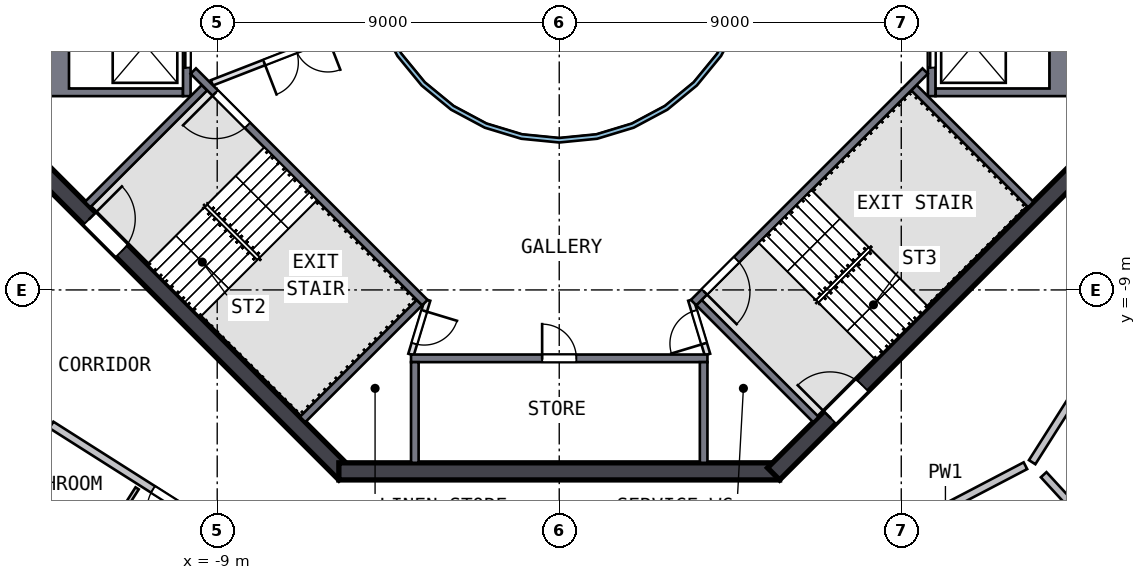
"""IFC4 building model, lengths in metres.
Left out: names, types, materials, properties, quantities, classifications, styles, units other than length and angle.
Written with IfcOpenShell. Run it as: python <this file> out.ifc"""

import sys

from ifc_helpers import new_model, si_unit, direction, frame, frame_2d, origin, place, context, subcontext, project, spatial, polyline, rectangle, outline, extrude, element, fill, save


model = new_model("IFC4")
c1 = context("Model", 3, precision=1e-05, world=origin(), true_north=direction((0.0, 1.0)))
c2 = subcontext(c1, "Body", "Model", "MODEL_VIEW")
j1 = project(units=[si_unit("LENGTHUNIT", "METRE"), si_unit("PLANEANGLEUNIT", "RADIAN")], contexts=[c1])
p1 = place(None, origin())
s1 = spatial("IfcSite", under=j1, at=p1, CompositionType="ELEMENT")
p2 = place(p1, origin())
s2 = spatial("IfcBuilding", under=s1, at=p2, CompositionType="ELEMENT")
p3 = place(p2, frame((0.0, 0.0, 269.0)))
s3 = spatial("IfcBuildingStorey", under=s2, at=p3, CompositionType="ELEMENT", Elevation=269.0)
p4 = place(p3, frame((-13.841, -5.64, 0.0), z_axis=(0.0, 0.0, 1.0), x_axis=(0.707106781, -0.707106781, 0.0)))
e1 = element("IfcWall", 1, at=p4, inside=s3, PredefinedType="SHEAR", context=c2, shape_type="SweptSolid", body=[
    extrude(rectangle(XDim=11.598, YDim=0.45, at=frame_2d((5.799, 0.0))), origin(), (0.0, 0.0, 1.0), 5.0),
])
p5 = place(p4, frame((2.099, 0.0, 0.0)))
e2 = element("IfcOpeningElement", 2, at=p5, cuts=e1, PredefinedType="OPENING", context=c2, shape_type="SweptSolid", body=[
    extrude(rectangle(XDim=1.2, YDim=2.1, at=frame_2d((0.6, 1.05))), frame((0.0, 0.235, 0.0), z_axis=(0.0, -1.0, 0.0), x_axis=(1.0, 0.0, 0.0)), (0.0, 0.0, 1.0), 0.47),
])
p6 = place(p3, frame((-5.799, -13.775, 0.0), z_axis=(0.0, 0.0, 1.0), x_axis=(1.0, 0.0, 0.0)))
e3 = element("IfcWall", 3, at=p6, inside=s3, PredefinedType="SHEAR", context=c2, shape_type="SweptSolid", body=[
    extrude(rectangle(XDim=11.598, YDim=0.45, at=frame_2d((5.799, 0.0))), origin(), (0.0, 0.0, 1.0), 5.0),
])
p7 = place(p3, frame((5.64, -13.841, 0.0), z_axis=(0.0, 0.0, 1.0), x_axis=(0.707106781, 0.707106781, 0.0)))
e4 = element("IfcWall", 4, at=p7, inside=s3, PredefinedType="SHEAR", context=c2, shape_type="SweptSolid", body=[
    extrude(rectangle(XDim=11.598, YDim=0.45, at=frame_2d((5.799, 0.0))), origin(), (0.0, 0.0, 1.0), 5.0),
])
p8 = place(p7, frame((2.099, 0.0, 0.0)))
e5 = element("IfcOpeningElement", 5, at=p8, cuts=e4, PredefinedType="OPENING", context=c2, shape_type="SweptSolid", body=[
    extrude(rectangle(XDim=1.2, YDim=2.1, at=frame_2d((0.6, 1.05))), frame((0.0, 0.235, 0.0), z_axis=(0.0, -1.0, 0.0), x_axis=(1.0, 0.0, 0.0)), (0.0, 0.0, 1.0), 0.47),
])
p9 = place(p3, origin())
e6 = element("IfcWall", 6, at=p9, inside=s3, PredefinedType="SOLIDWALL", context=c2, shape_type="SweptSolid", body=[
    extrude(outline(polyline([(13.55, -3.9), (9.9, -3.9), (9.9, -3.7), (12.9, -3.7), (12.9, -1.4), (9.9, -1.4), (9.9, -1.2), (13.55, -1.2), (13.55, -3.9)])), origin(), (0.0, 0.0, 1.0), 4.69),
])
p10 = place(p3, frame((9.8, -1.2, 0.0), z_axis=(0.0, 0.0, 1.0), x_axis=(0.0, -1.0, 0.0)))
e7 = element("IfcWall", 7, at=p10, inside=s3, PredefinedType="SOLIDWALL", context=c2, shape_type="SweptSolid", body=[
    extrude(rectangle(XDim=2.7, YDim=0.2, at=frame_2d((1.35, 0.0))), origin(), (0.0, 0.0, 1.0), 4.69),
])
p11 = place(p10, frame((0.75, 0.0, 0.0)))
e8 = element("IfcOpeningElement", 8, at=p11, cuts=e7, PredefinedType="OPENING", context=c2, shape_type="SweptSolid", body=[
    extrude(rectangle(XDim=1.2, YDim=2.1, at=frame_2d((0.6, 1.05))), frame((0.0, 0.11, 0.0), z_axis=(0.0, -1.0, 0.0), x_axis=(1.0, 0.0, 0.0)), (0.0, 0.0, 1.0), 0.22),
])
p12 = place(p3, origin())
e9 = element("IfcWall", 9, at=p12, inside=s3, PredefinedType="SOLIDWALL", context=c2, shape_type="SweptSolid", body=[
    extrude(outline(polyline([(-13.55, -3.9), (-13.55, -1.2), (-9.9, -1.2), (-9.9, -1.4), (-12.9, -1.4), (-12.9, -3.7), (-9.9, -3.7), (-9.9, -3.9), (-13.55, -3.9)])), origin(), (0.0, 0.0, 1.0), 4.69),
])
p13 = place(p3, frame((-9.8, -1.2, 0.0), z_axis=(0.0, 0.0, 1.0), x_axis=(0.0, -1.0, 0.0)))
e10 = element("IfcWall", 10, at=p13, inside=s3, PredefinedType="SOLIDWALL", context=c2, shape_type="SweptSolid", body=[
    extrude(rectangle(XDim=2.7, YDim=0.2, at=frame_2d((1.35, 0.0))), origin(), (0.0, 0.0, 1.0), 4.69),
])
p14 = place(p13, frame((0.75, 0.0, 0.0)))
e11 = element("IfcOpeningElement", 11, at=p14, cuts=e10, PredefinedType="OPENING", context=c2, shape_type="SweptSolid", body=[
    extrude(rectangle(XDim=1.2, YDim=2.1, at=frame_2d((0.6, 1.05))), frame((0.0, 0.11, 0.0), z_axis=(0.0, -1.0, 0.0), x_axis=(1.0, 0.0, 0.0)), (0.0, 0.0, 1.0), 0.22),
])
p15 = place(p3, frame((-3.9, -10.8, 0.0), z_axis=(0.0, 0.0, 1.0), x_axis=(1.0, 0.0, 0.0)))
e12 = element("IfcWall", 12, at=p15, inside=s3, PredefinedType="SOLIDWALL", context=c2, shape_type="SweptSolid", body=[
    extrude(rectangle(XDim=7.8, YDim=0.2, at=frame_2d((3.9, 0.0))), origin(), (0.0, 0.0, 1.0), 4.69),
])
p16 = place(p15, frame((3.45, 0.0, 0.0)))
e13 = element("IfcOpeningElement", 13, at=p16, cuts=e12, PredefinedType="OPENING", context=c2, shape_type="SweptSolid", body=[
    extrude(rectangle(XDim=0.9, YDim=2.1, at=frame_2d((0.45, 1.05))), frame((0.0, 0.11, 0.0), z_axis=(0.0, -1.0, 0.0), x_axis=(1.0, 0.0, 0.0)), (0.0, 0.0, 1.0), 0.22),
])
for number, where, z_axis, x_axis in (
    (14, (-3.8, -10.9, 0.0), (0.0, 0.0, 1.0), (0.0, -1.0, 0.0)),
    (15, (3.8, -10.9, 0.0), (0.0, 0.0, 1.0), (0.0, -1.0, 0.0)),
):
    element("IfcWall", number, at=place(p3, frame(where, z_axis=z_axis, x_axis=x_axis)), inside=s3, PredefinedType="SOLIDWALL", context=c2, shape_type="SweptSolid", body=[
        extrude(rectangle(XDim=2.65, YDim=0.2, at=frame_2d((1.325, 0.0))), origin(), (0.0, 0.0, 1.0), 4.69),
    ])
p17 = place(p3, frame((-3.535, -9.334, 0.0), z_axis=(0.0, 0.0, 1.0), x_axis=(-0.707120946, 0.707092617, 0.0)))
e16 = element("IfcWall", 16, at=p17, inside=s3, PredefinedType="SOLIDWALL", context=c2, shape_type="SweptSolid", body=[
    extrude(rectangle(XDim=8.618, YDim=0.2, at=frame_2d((4.309, 0.0))), origin(), (0.0, 0.0, 1.0), 4.69),
])
p18 = place(p17, frame((6.6, 0.0, 0.0)))
e17 = element("IfcOpeningElement", 17, at=p18, cuts=e16, PredefinedType="OPENING", context=c2, shape_type="SweptSolid", body=[
    extrude(rectangle(XDim=1.2, YDim=2.1, at=frame_2d((0.6, 1.05))), frame((0.0, 0.11, 0.0), z_axis=(0.0, -1.0, 0.0), x_axis=(1.0, 0.0, 0.0)), (0.0, 0.0, 1.0), 0.22),
])
for number, where, z_axis, x_axis in (
    (18, (-9.334, -3.677, 0.0), (0.0, 0.0, 1.0), (-0.707, -0.707, 0.0)),
    (19, (-3.677, -9.334, 0.0), (0.0, 0.0, 1.0), (-0.707, -0.707, 0.0)),
):
    element("IfcWall", number, at=place(p3, frame(where, z_axis=z_axis, x_axis=x_axis)), inside=s3, PredefinedType="SOLIDWALL", context=c2, shape_type="SweptSolid", body=[
        extrude(rectangle(XDim=4.35, YDim=0.2, at=frame_2d((2.175, 0.0))), origin(), (0.0, 0.0, 1.0), 4.69),
    ])
p19 = place(p3, frame((9.629, -3.24, 0.0), z_axis=(0.0, 0.0, 1.0), x_axis=(-0.707120946, -0.707092617, 0.0)))
e20 = element("IfcWall", 20, at=p19, inside=s3, PredefinedType="SOLIDWALL", context=c2, shape_type="SweptSolid", body=[
    extrude(rectangle(XDim=8.618, YDim=0.2, at=frame_2d((4.309, 0.0))), origin(), (0.0, 0.0, 1.0), 4.69),
])
p20 = place(p19, frame((7.018, 0.0, 0.0)))
e21 = element("IfcOpeningElement", 21, at=p20, cuts=e20, PredefinedType="OPENING", context=c2, shape_type="SweptSolid", body=[
    extrude(rectangle(XDim=1.2, YDim=2.1, at=frame_2d((0.6, 1.05))), frame((0.0, 0.11, 0.0), z_axis=(0.0, -1.0, 0.0), x_axis=(1.0, 0.0, 0.0)), (0.0, 0.0, 1.0), 0.22),
])
for number, where, z_axis, x_axis in (
    (22, (3.677, -9.334, 0.0), (0.0, 0.0, 1.0), (0.707, -0.707, 0.0)),
    (23, (9.334, -3.677, 0.0), (0.0, 0.0, 1.0), (0.707, -0.707, 0.0)),
):
    element("IfcWall", number, at=place(p3, frame(where, z_axis=z_axis, x_axis=x_axis)), inside=s3, PredefinedType="SOLIDWALL", context=c2, shape_type="SweptSolid", body=[
        extrude(rectangle(XDim=4.35, YDim=0.2, at=frame_2d((2.175, 0.0))), origin(), (0.0, 0.0, 1.0), 4.69),
    ])
p21 = place(p3, frame((-3.465, -9.263, 0.0), z_axis=(0.0, 0.0, 1.0), x_axis=(-0.289808785, -0.957084567, 0.0)))
e24 = element("IfcWall", 24, at=p21, inside=s3, PredefinedType="PARTITIONING", context=c2, shape_type="SweptSolid", body=[
    extrude(rectangle(XDim=1.501, YDim=0.15, at=frame_2d((0.75, 0.0))), origin(), (0.0, 0.0, 1.0), 4.69),
])
p22 = place(p21, frame((0.301, 0.0, 0.0)))
e25 = element("IfcOpeningElement", 25, at=p22, cuts=e24, PredefinedType="OPENING", context=c2, shape_type="SweptSolid", body=[
    extrude(rectangle(XDim=0.9, YDim=2.1, at=frame_2d((0.45, 1.05))), frame((0.0, 0.085, 0.0), z_axis=(0.0, -1.0, 0.0), x_axis=(1.0, 0.0, 0.0)), (0.0, 0.0, 1.0), 0.17),
])
p23 = place(p3, frame((3.9, -10.7, 0.0), z_axis=(0.0, 0.0, 1.0), x_axis=(-0.289808785, 0.957084567, 0.0)))
e26 = element("IfcWall", 26, at=p23, inside=s3, PredefinedType="PARTITIONING", context=c2, shape_type="SweptSolid", body=[
    extrude(rectangle(XDim=1.501, YDim=0.15, at=frame_2d((0.75, 0.0))), origin(), (0.0, 0.0, 1.0), 4.69),
])
p24 = place(p23, frame((0.301, 0.0, 0.0)))
e27 = element("IfcOpeningElement", 27, at=p24, cuts=e26, PredefinedType="OPENING", context=c2, shape_type="SweptSolid", body=[
    extrude(rectangle(XDim=0.9, YDim=2.1, at=frame_2d((0.45, 1.05))), frame((0.0, 0.085, 0.0), z_axis=(0.0, -1.0, 0.0), x_axis=(1.0, 0.0, 0.0)), (0.0, 0.0, 1.0), 0.17),
])
p25 = place(p3, frame((-4.782, -1.857, 0.0), z_axis=(0.0, 0.0, 1.0), x_axis=(-0.932167228, -0.36202798, 0.0)))
e28 = element("IfcWall", 28, at=p25, inside=s3, PredefinedType="PARTITIONING", context=c2, shape_type="SweptSolid", body=[
    extrude(rectangle(XDim=4.676, YDim=0.15, at=frame_2d((2.338, 0.0))), origin(), (0.0, 0.0, 1.0), 4.69),
])
p26 = place(p25, frame((1.4, 0.0, 0.0)))
e29 = element("IfcOpeningElement", 29, at=p26, cuts=e28, PredefinedType="OPENING", context=c2, shape_type="SweptSolid", body=[
    extrude(rectangle(XDim=1.8, YDim=2.1, at=frame_2d((0.9, 1.05))), frame((0.0, 0.085, 0.0), z_axis=(0.0, -1.0, 0.0), x_axis=(1.0, 0.0, 0.0)), (0.0, 0.0, 1.0), 0.17),
])
p27 = place(p3, origin())
e30 = element("IfcWall", 30, at=p27, inside=s3, PredefinedType="SOLIDWALL", context=c2, shape_type="SweptSolid", body=[
    extrude(outline(polyline([(5.021, -0.999), (4.73, -1.959), (4.257, -2.844), (3.62, -3.62), (2.844, -4.257), (1.959, -4.73), (0.999, -5.021), (0.0, -5.12), (-0.999, -5.021), (-1.959, -4.73), (-2.844, -4.257), (-3.62, -3.62), (-4.257, -2.844), (-4.73, -1.959), (-5.021, -0.999), (-5.12, 0.0), (-5.021, 0.999), (-4.73, 1.959), (-4.257, 2.844), (-3.62, 3.62), (-2.844, 4.257), (-1.959, 4.73), (-0.999, 5.021), (0.0, 5.12), (0.999, 5.021), (1.959, 4.73), (2.844, 4.257), (3.62, 3.62), (4.257, 2.844), (4.73, 1.959), (5.021, 0.999), (5.12, 0.0), (5.021, -0.999)]), holes=[polyline([(4.904, 0.976), (4.619, 1.913), (4.157, 2.778), (3.535, 3.535), (2.778, 4.157), (1.913, 4.619), (0.976, 4.904), (0.0, 5.0), (-0.976, 4.904), (-1.913, 4.619), (-2.778, 4.157), (-3.535, 3.535), (-4.157, 2.778), (-4.619, 1.913), (-4.904, 0.976), (-5.0, 0.0), (-4.904, -0.976), (-4.619, -1.913), (-4.157, -2.778), (-3.535, -3.535), (-2.778, -4.157), (-1.913, -4.619), (-0.976, -4.904), (0.0, -5.0), (0.976, -4.904), (1.913, -4.619), (2.778, -4.157), (3.535, -3.535), (4.157, -2.778), (4.619, -1.913), (4.904, -0.976), (5.0, 0.0), (4.904, 0.976)])]), origin(), (0.0, 0.0, 1.0), 4.69),
])
p28 = place(p3, frame((-5.498, -17.543, 0.0), z_axis=(0.0, 0.0, 1.0), x_axis=(-0.844333068, 0.535818692, 0.0)))
e31 = element("IfcWall", 31, at=p28, inside=s3, PredefinedType="SOLIDWALL", context=c2, shape_type="SweptSolid", body=[
    extrude(rectangle(XDim=9.316, YDim=0.2, at=frame_2d((4.658, 0.0))), origin(), (0.0, 0.0, 1.0), 4.69),
])
p29 = place(p28, frame((5.15, 0.0, 0.0)))
e32 = element("IfcOpeningElement", 32, at=p29, cuts=e31, PredefinedType="OPENING", context=c2, shape_type="SweptSolid", body=[
    extrude(rectangle(XDim=1.0, YDim=2.1, at=frame_2d((0.5, 1.05))), frame((0.0, 0.11, 0.0), z_axis=(0.0, -1.0, 0.0), x_axis=(1.0, 0.0, 0.0)), (0.0, 0.0, 1.0), 0.22),
])
p30 = place(p3, frame((12.267, -13.626, 0.0), z_axis=(0.0, 0.0, 1.0), x_axis=(-0.886204454, -0.463294363, 0.0)))
e33 = element("IfcWall", 33, at=p30, inside=s3, PredefinedType="SOLIDWALL", context=c2, shape_type="SweptSolid", body=[
    extrude(rectangle(XDim=9.116, YDim=0.2, at=frame_2d((4.558, 0.0))), origin(), (0.0, 0.0, 1.0), 4.69),
])
p31 = place(p30, frame((4.95, 0.0, 0.0)))
e34 = element("IfcOpeningElement", 34, at=p31, cuts=e33, PredefinedType="OPENING", context=c2, shape_type="SweptSolid", body=[
    extrude(rectangle(XDim=1.0, YDim=2.1, at=frame_2d((0.5, 1.05))), frame((0.0, 0.11, 0.0), z_axis=(0.0, -1.0, 0.0), x_axis=(1.0, 0.0, 0.0)), (0.0, 0.0, 1.0), 0.22),
])
p32 = place(p3, frame((12.444, -13.533, 0.0), z_axis=(0.0, 0.0, 1.0), x_axis=(0.535839212, 0.844320045, 0.0)))
e35 = element("IfcWall", 35, at=p32, inside=s3, PredefinedType="SOLIDWALL", context=c2, shape_type="SweptSolid", body=[
    extrude(rectangle(XDim=9.516, YDim=0.2, at=frame_2d((4.758, 0.0))), origin(), (0.0, 0.0, 1.0), 4.69),
])
p33 = place(p3, frame((16.999, -18.486, 0.0), z_axis=(0.0, 0.0, 1.0), x_axis=(-0.676871278, 0.736101401, 0.0)))
e36 = element("IfcWall", 36, at=p33, inside=s3, PredefinedType="SOLIDWALL", context=c2, shape_type="SweptSolid", body=[
    extrude(rectangle(XDim=6.282, YDim=0.2, at=frame_2d((3.141, 0.0))), origin(), (0.0, 0.0, 1.0), 4.69),
])
p34 = place(p3, frame((-12.768, -16.838, 0.0), z_axis=(0.0, 0.0, 1.0), x_axis=(0.535876266, 0.844296528, 0.0)))
e37 = element("IfcWall", 37, at=p34, inside=s3, PredefinedType="PARTITIONING", context=c2, shape_type="SweptSolid", body=[
    extrude(rectangle(XDim=3.1, YDim=0.1, at=frame_2d((1.55, 0.0))), origin(), (0.0, 0.0, 1.0), 4.69),
])
p35 = place(p34, frame((1.15, 0.0, 0.0)))
e38 = element("IfcOpeningElement", 38, at=p35, cuts=e37, PredefinedType="OPENING", context=c2, shape_type="SweptSolid", body=[
    extrude(rectangle(XDim=0.9, YDim=2.1, at=frame_2d((0.45, 1.05))), frame((0.0, 0.06, 0.0), z_axis=(0.0, -1.0, 0.0), x_axis=(1.0, 0.0, 0.0)), (0.0, 0.0, 1.0), 0.12),
])
p36 = place(p16, origin())
e39 = element("IfcDoor", 39, at=p36, inside=s3, OperationType="SINGLE_SWING_LEFT", PredefinedType="DOOR", context=c2, shape_type="SweptSolid", body=[
    extrude(rectangle(XDim=0.9, YDim=2.1, at=frame_2d((0.45, 1.05))), frame((0.0, 0.025, 0.0), z_axis=(0.0, -1.0, 0.0), x_axis=(1.0, 0.0, 0.0)), (0.0, 0.0, 1.0), 0.05),
])
fill(e13, e39)
p37 = place(p11, origin())
e40 = element("IfcDoor", 40, at=p37, inside=s3, OperationType="DOUBLE_DOOR_SLIDING", PredefinedType="DOOR", context=c2, shape_type="SweptSolid", body=[
    extrude(rectangle(XDim=1.2, YDim=2.1, at=frame_2d((0.6, 1.05))), frame((0.0, 0.025, 0.0), z_axis=(0.0, -1.0, 0.0), x_axis=(1.0, 0.0, 0.0)), (0.0, 0.0, 1.0), 0.05),
])
fill(e8, e40)
p38 = place(p14, origin())
e41 = element("IfcDoor", 41, at=p38, inside=s3, OperationType="DOUBLE_DOOR_SLIDING", PredefinedType="DOOR", context=c2, shape_type="SweptSolid", body=[
    extrude(rectangle(XDim=1.2, YDim=2.1, at=frame_2d((0.6, 1.05))), frame((0.0, 0.025, 0.0), z_axis=(0.0, -1.0, 0.0), x_axis=(1.0, 0.0, 0.0)), (0.0, 0.0, 1.0), 0.05),
])
fill(e11, e41)
p39 = place(p18, origin())
e42 = element("IfcDoor", 42, at=p39, inside=s3, OperationType="SINGLE_SWING_RIGHT", PredefinedType="DOOR", context=c2, shape_type="SweptSolid", body=[
    extrude(rectangle(XDim=1.2, YDim=2.1, at=frame_2d((0.6, 1.05))), frame((0.0, 0.025, 0.0), z_axis=(0.0, -1.0, 0.0), x_axis=(1.0, 0.0, 0.0)), (0.0, 0.0, 1.0), 0.05),
])
fill(e17, e42)
p40 = place(p20, origin())
e43 = element("IfcDoor", 43, at=p40, inside=s3, OperationType="SINGLE_SWING_RIGHT", PredefinedType="DOOR", context=c2, shape_type="SweptSolid", body=[
    extrude(rectangle(XDim=1.2, YDim=2.1, at=frame_2d((0.6, 1.05))), frame((0.0, 0.025, 0.0), z_axis=(0.0, -1.0, 0.0), x_axis=(1.0, 0.0, 0.0)), (0.0, 0.0, 1.0), 0.05),
])
fill(e21, e43)
p41 = place(p5, origin())
e44 = element("IfcDoor", 44, at=p41, inside=s3, OperationType="SINGLE_SWING_LEFT", PredefinedType="DOOR", context=c2, shape_type="SweptSolid", body=[
    extrude(rectangle(XDim=1.2, YDim=2.1, at=frame_2d((0.6, 1.05))), frame((0.0, 0.025, 0.0), z_axis=(0.0, -1.0, 0.0), x_axis=(1.0, 0.0, 0.0)), (0.0, 0.0, 1.0), 0.05),
])
fill(e2, e44)
p42 = place(p8, origin())
e45 = element("IfcDoor", 45, at=p42, inside=s3, OperationType="SINGLE_SWING_LEFT", PredefinedType="DOOR", context=c2, shape_type="SweptSolid", body=[
    extrude(rectangle(XDim=1.2, YDim=2.1, at=frame_2d((0.6, 1.05))), frame((0.0, 0.025, 0.0), z_axis=(0.0, -1.0, 0.0), x_axis=(1.0, 0.0, 0.0)), (0.0, 0.0, 1.0), 0.05),
])
fill(e5, e45)
p43 = place(p22, origin())
e46 = element("IfcDoor", 46, at=p43, inside=s3, OperationType="SINGLE_SWING_LEFT", PredefinedType="DOOR", context=c2, shape_type="SweptSolid", body=[
    extrude(rectangle(XDim=0.9, YDim=2.1, at=frame_2d((0.45, 1.05))), frame((0.0, 0.025, 0.0), z_axis=(0.0, -1.0, 0.0), x_axis=(1.0, 0.0, 0.0)), (0.0, 0.0, 1.0), 0.05),
])
fill(e25, e46)
p44 = place(p24, origin())
e47 = element("IfcDoor", 47, at=p44, inside=s3, OperationType="SINGLE_SWING_LEFT", PredefinedType="DOOR", context=c2, shape_type="SweptSolid", body=[
    extrude(rectangle(XDim=0.9, YDim=2.1, at=frame_2d((0.45, 1.05))), frame((0.0, 0.025, 0.0), z_axis=(0.0, -1.0, 0.0), x_axis=(1.0, 0.0, 0.0)), (0.0, 0.0, 1.0), 0.05),
])
fill(e27, e47)
p45 = place(p26, origin())
e48 = element("IfcDoor", 48, at=p45, inside=s3, OperationType="DOUBLE_DOOR_SINGLE_SWING", PredefinedType="DOOR", context=c2, shape_type="SweptSolid", body=[
    extrude(rectangle(XDim=1.8, YDim=2.1, at=frame_2d((0.9, 1.05))), frame((0.0, 0.025, 0.0), z_axis=(0.0, -1.0, 0.0), x_axis=(1.0, 0.0, 0.0)), (0.0, 0.0, 1.0), 0.05),
])
fill(e29, e48)
p46 = place(p29, origin())
e49 = element("IfcDoor", 49, at=p46, inside=s3, OperationType="SINGLE_SWING_LEFT", PredefinedType="DOOR", context=c2, shape_type="SweptSolid", body=[
    extrude(rectangle(XDim=1.0, YDim=2.1, at=frame_2d((0.5, 1.05))), frame((0.0, 0.025, 0.0), z_axis=(0.0, -1.0, 0.0), x_axis=(1.0, 0.0, 0.0)), (0.0, 0.0, 1.0), 0.05),
])
fill(e32, e49)
save(model, sys.argv[1])
